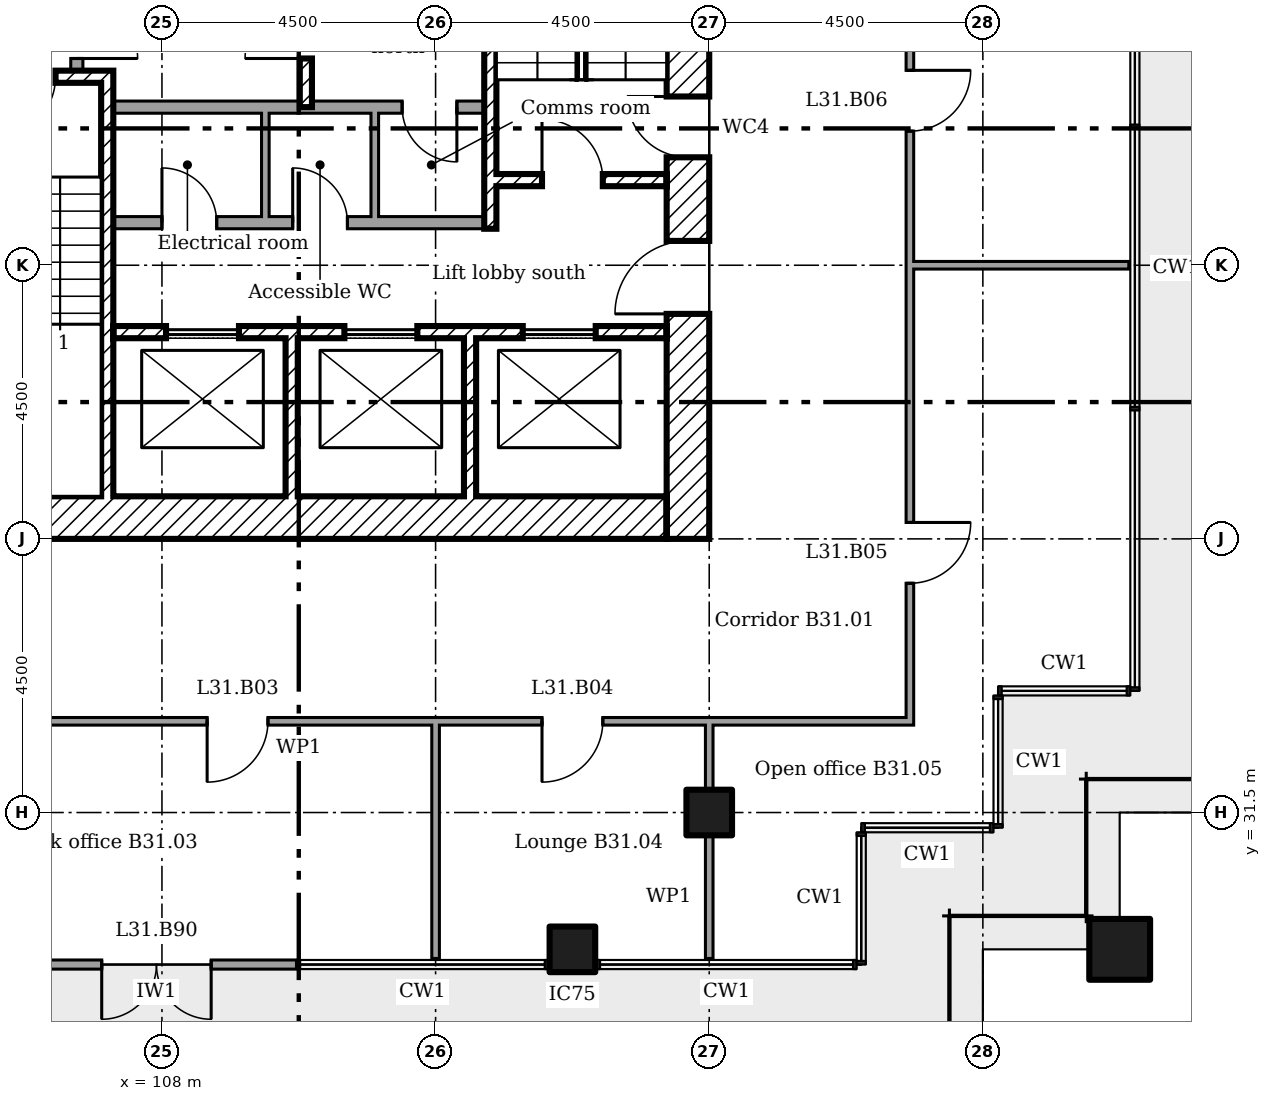
"""IFC4 building model, lengths in metres.
Left out: names, types, materials, properties, quantities, classifications, styles, units other than length and angle.
Written with IfcOpenShell. Run it as: python <this file> out.ifc"""

import sys

from ifc_helpers import new_model, si_unit, direction, frame, frame_2d, origin, origin_2d, place, context, subcontext, project, spatial, rectangle, extrude, element, fill, save


model = new_model("IFC4")
c1 = context("Model", 3, precision=1e-05, world=origin(), true_north=direction((0.0, 1.0)))
c2 = subcontext(c1, "Body", "Model", "MODEL_VIEW")
j1 = project(units=[si_unit("LENGTHUNIT", "METRE"), si_unit("PLANEANGLEUNIT", "RADIAN")], contexts=[c1])
p1 = place(None, origin())
s1 = spatial("IfcSite", under=j1, at=p1, CompositionType="ELEMENT")
p2 = place(p1, origin())
s2 = spatial("IfcBuilding", under=s1, at=p2, CompositionType="ELEMENT")
p3 = place(p2, frame((0.0, 0.0, 128.0)))
s3 = spatial("IfcBuildingStorey", under=s2, at=p3, CompositionType="ELEMENT", Elevation=128.0)
p4 = place(p3, frame((123.75, 29.25, 0.0)))
e1 = element("IfcColumn", 1, at=p4, inside=s3, PredefinedType="COLUMN", context=c2, shape_type="SweptSolid", body=[
    extrude(rectangle(XDim=1.0, YDim=1.0, at=origin_2d()), origin(), (0.0, 0.0, 1.0), 3.6),
])
for number, where in (
    (2, (114.75, 29.25, 0.0)),
    (3, (117.0, 31.5, 0.0)),
):
    element("IfcColumn", number, at=place(p3, frame(where)), inside=s3, PredefinedType="COLUMN", context=c2, shape_type="SweptSolid", body=[
        extrude(rectangle(XDim=0.75, YDim=0.75, at=origin_2d()), origin(), (0.0, 0.0, 1.0), 3.6),
    ])
p5 = place(p3, frame((105.606, 29.0, 0.0)))
e4 = element("IfcWall", 4, at=p5, inside=s3, PredefinedType="SOLIDWALL", context=c2, shape_type="SweptSolid", body=[
    extrude(rectangle(XDim=4.606, YDim=0.15, at=frame_2d((2.303, 0.0))), origin(), (0.0, 0.0, 1.0), 3.45),
])
p6 = place(p5, frame((1.403, 0.0, 0.0)))
e5 = element("IfcOpeningElement", 5, at=p6, cuts=e4, PredefinedType="OPENING", context=c2, shape_type="SweptSolid", body=[
    extrude(rectangle(XDim=1.8, YDim=2.4, at=frame_2d((0.9, 1.2))), frame((0.0, 0.085, 0.0), z_axis=(0.0, -1.0, 0.0), x_axis=(1.0, 0.0, 0.0)), (0.0, 0.0, 1.0), 0.17),
])
p7 = place(p3, frame((116.65, 36.0, 0.0), z_axis=(0.0, 0.0, 1.0), x_axis=(0.0, 1.0, 0.0)))
e6 = element("IfcWall", 6, at=p7, inside=s3, PredefinedType="SHEAR", context=c2, shape_type="SweptSolid", body=[
    extrude(rectangle(XDim=13.5, YDim=0.7, at=frame_2d((6.75, 0.0))), origin(), (0.0, 0.0, 1.0), 3.35),
])
p8 = place(p7, frame((3.7, 0.0, 0.0)))
e7 = element("IfcOpeningElement", 7, at=p8, cuts=e6, PredefinedType="OPENING", context=c2, shape_type="SweptSolid", body=[
    extrude(rectangle(XDim=1.2, YDim=2.1, at=frame_2d((0.6, 1.05))), frame((0.0, 0.36, 0.0), z_axis=(0.0, -1.0, 0.0), x_axis=(1.0, 0.0, 0.0)), (0.0, 0.0, 1.0), 0.72),
])
p9 = place(p7, frame((6.275, 0.0, 0.0)))
e8 = element("IfcOpeningElement", 8, at=p9, cuts=e6, PredefinedType="OPENING", context=c2, shape_type="SweptSolid", body=[
    extrude(rectangle(XDim=1.0, YDim=2.1, at=frame_2d((0.5, 1.05))), frame((0.0, 0.36, 0.0), z_axis=(0.0, -1.0, 0.0), x_axis=(1.0, 0.0, 0.0)), (0.0, 0.0, 1.0), 0.72),
])
p10 = place(p3, frame((104.2, 36.35, 0.0)))
e9 = element("IfcWall", 9, at=p10, inside=s3, PredefinedType="SHEAR", context=c2, shape_type="SweptSolid", body=[
    extrude(rectangle(XDim=12.1, YDim=0.7, at=frame_2d((6.05, 0.0))), origin(), (0.0, 0.0, 1.0), 3.35),
])
p11 = place(p3, frame((110.367, 48.8, 0.0), z_axis=(0.0, 0.0, 1.0), x_axis=(0.0, -1.0, 0.0)))
e10 = element("IfcWall", 10, at=p11, inside=s3, PredefinedType="SHEAR", context=c2, shape_type="SweptSolid", body=[
    extrude(rectangle(XDim=5.7, YDim=0.2, at=frame_2d((2.85, 0.0))), origin(), (0.0, 0.0, 1.0), 3.35),
])
p12 = place(p11, frame((3.9, 0.0, 0.0)))
e11 = element("IfcOpeningElement", 11, at=p12, cuts=e10, PredefinedType="OPENING", context=c2, shape_type="SweptSolid", body=[
    extrude(rectangle(XDim=1.0, YDim=2.1, at=frame_2d((0.5, 1.05))), frame((0.0, 0.11, 0.0), z_axis=(0.0, -1.0, 0.0), x_axis=(1.0, 0.0, 0.0)), (0.0, 0.0, 1.0), 0.22),
])
for number, where, z_axis, x_axis in (
    (12, (110.133, 36.7, 0.0), (0.0, 0.0, 1.0), (0.0, 1.0, 0.0)),
    (13, (113.067, 36.7, 0.0), (0.0, 0.0, 1.0), (0.0, 1.0, 0.0)),
):
    element("IfcWall", number, at=place(p3, frame(where, z_axis=z_axis, x_axis=x_axis)), inside=s3, PredefinedType="SHEAR", context=c2, shape_type="SweptSolid", body=[
        extrude(rectangle(XDim=2.6, YDim=0.2, at=frame_2d((1.3, 0.0))), origin(), (0.0, 0.0, 1.0), 3.35),
    ])
p13 = place(p3, frame((106.6, 43.7, 0.0), z_axis=(0.0, 0.0, 1.0), x_axis=(0.0, 1.0, 0.0)))
e14 = element("IfcWall", 14, at=p13, inside=s3, PredefinedType="PARTITIONING", context=c2, shape_type="SweptSolid", body=[
    extrude(rectangle(XDim=1.5, YDim=0.2, at=frame_2d((0.75, 0.0))), origin(), (0.0, 0.0, 1.0), 3.35),
])
p14 = place(p13, frame((0.2, 0.0, 0.0)))
e15 = element("IfcOpeningElement", 15, at=p14, cuts=e14, PredefinedType="OPENING", context=c2, shape_type="SweptSolid", body=[
    extrude(rectangle(XDim=1.0, YDim=2.1, at=frame_2d((0.5, 1.05))), frame((0.0, 0.11, 0.0), z_axis=(0.0, -1.0, 0.0), x_axis=(1.0, 0.0, 0.0)), (0.0, 0.0, 1.0), 0.22),
])
p15 = place(p3, frame((107.2, 39.4, 0.0)))
e16 = element("IfcWall", 16, at=p15, inside=s3, PredefinedType="SHEAR", context=c2, shape_type="SweptSolid", body=[
    extrude(rectangle(XDim=9.1, YDim=0.2, at=frame_2d((4.55, 0.0))), origin(), (0.0, 0.0, 1.0), 3.35),
])
p16 = place(p15, frame((0.867, 0.0, 0.0)))
e17 = element("IfcOpeningElement", 17, at=p16, cuts=e16, PredefinedType="OPENING", context=c2, shape_type="SweptSolid", body=[
    extrude(rectangle(XDim=1.2, YDim=2.1, at=frame_2d((0.6, 1.05))), frame((0.0, 0.11, 0.0), z_axis=(0.0, -1.0, 0.0), x_axis=(1.0, 0.0, 0.0)), (0.0, 0.0, 1.0), 0.22),
])
p17 = place(p15, frame((3.8, 0.0, 0.0)))
e18 = element("IfcOpeningElement", 18, at=p17, cuts=e16, PredefinedType="OPENING", context=c2, shape_type="SweptSolid", body=[
    extrude(rectangle(XDim=1.2, YDim=2.1, at=frame_2d((0.6, 1.05))), frame((0.0, 0.11, 0.0), z_axis=(0.0, -1.0, 0.0), x_axis=(1.0, 0.0, 0.0)), (0.0, 0.0, 1.0), 0.22),
])
p18 = place(p15, frame((6.733, 0.0, 0.0)))
e19 = element("IfcOpeningElement", 19, at=p18, cuts=e16, PredefinedType="OPENING", context=c2, shape_type="SweptSolid", body=[
    extrude(rectangle(XDim=1.2, YDim=2.1, at=frame_2d((0.6, 1.05))), frame((0.0, 0.11, 0.0), z_axis=(0.0, -1.0, 0.0), x_axis=(1.0, 0.0, 0.0)), (0.0, 0.0, 1.0), 0.22),
])
p19 = place(p3, frame((107.1, 36.7, 0.0), z_axis=(0.0, 0.0, 1.0), x_axis=(0.0, 1.0, 0.0)))
e20 = element("IfcWall", 20, at=p19, inside=s3, PredefinedType="SHEAR", context=c2, shape_type="SweptSolid", body=[
    extrude(rectangle(XDim=7.0, YDim=0.2, at=frame_2d((3.5, 0.0))), origin(), (0.0, 0.0, 1.0), 3.35),
])
p20 = place(p3, frame((104.2, 43.6, 0.0)))
e21 = element("IfcWall", 21, at=p20, inside=s3, PredefinedType="SHEAR", context=c2, shape_type="SweptSolid", body=[
    extrude(rectangle(XDim=2.8, YDim=0.2, at=frame_2d((1.4, 0.0))), origin(), (0.0, 0.0, 1.0), 3.35),
])
p21 = place(p20, frame((1.05, 0.0, 0.0)))
e22 = element("IfcOpeningElement", 22, at=p21, cuts=e21, PredefinedType="OPENING", context=c2, shape_type="SweptSolid", body=[
    extrude(rectangle(XDim=1.0, YDim=2.1, at=frame_2d((0.5, 1.05))), frame((0.0, 0.11, 0.0), z_axis=(0.0, -1.0, 0.0), x_axis=(1.0, 0.0, 0.0)), (0.0, 0.0, 1.0), 0.22),
])
p22 = place(p3, frame((113.5, 41.9, 0.0)))
e23 = element("IfcWall", 23, at=p22, inside=s3, PredefinedType="SHEAR", context=c2, shape_type="SweptSolid", body=[
    extrude(rectangle(XDim=2.8, YDim=0.2, at=frame_2d((1.4, 0.0))), origin(), (0.0, 0.0, 1.0), 3.35),
])
p23 = place(p22, frame((0.75, 0.0, 0.0)))
e24 = element("IfcOpeningElement", 24, at=p23, cuts=e23, PredefinedType="OPENING", context=c2, shape_type="SweptSolid", body=[
    extrude(rectangle(XDim=1.0, YDim=2.1, at=frame_2d((0.5, 1.05))), frame((0.0, 0.11, 0.0), z_axis=(0.0, -1.0, 0.0), x_axis=(1.0, 0.0, 0.0)), (0.0, 0.0, 1.0), 0.22),
])
p24 = place(p3, frame((113.4, 41.1, 0.0), z_axis=(0.0, 0.0, 1.0), x_axis=(0.0, 1.0, 0.0)))
e25 = element("IfcWall", 25, at=p24, inside=s3, PredefinedType="SHEAR", context=c2, shape_type="SweptSolid", body=[
    extrude(rectangle(XDim=7.7, YDim=0.2, at=frame_2d((3.85, 0.0))), origin(), (0.0, 0.0, 1.0), 3.35),
])
p25 = place(p3, frame((107.2, 43.1, 0.0)))
e26 = element("IfcWall", 26, at=p25, inside=s3, PredefinedType="PARTITIONING", context=c2, shape_type="SweptSolid", body=[
    extrude(rectangle(XDim=6.1, YDim=0.2, at=frame_2d((3.05, 0.0))), origin(), (0.0, 0.0, 1.0), 3.35),
])
p26 = place(p25, frame((4.75, 0.0, 0.0)))
e27 = element("IfcOpeningElement", 27, at=p26, cuts=e26, PredefinedType="OPENING", context=c2, shape_type="SweptSolid", body=[
    extrude(rectangle(XDim=0.9, YDim=2.1, at=frame_2d((0.45, 1.05))), frame((0.0, 0.11, 0.0), z_axis=(0.0, -1.0, 0.0), x_axis=(1.0, 0.0, 0.0)), (0.0, 0.0, 1.0), 0.22),
])
p27 = place(p3, frame((107.2, 41.2, 0.0)))
e28 = element("IfcWall", 28, at=p27, inside=s3, PredefinedType="PARTITIONING", context=c2, shape_type="SweptSolid", body=[
    extrude(rectangle(XDim=6.1, YDim=0.2, at=frame_2d((3.05, 0.0))), origin(), (0.0, 0.0, 1.0), 3.35),
])
p28 = place(p27, frame((0.8, 0.0, 0.0)))
e29 = element("IfcOpeningElement", 29, at=p28, cuts=e28, PredefinedType="OPENING", context=c2, shape_type="SweptSolid", body=[
    extrude(rectangle(XDim=0.9, YDim=2.1, at=frame_2d((0.45, 1.05))), frame((0.0, 0.11, 0.0), z_axis=(0.0, -1.0, 0.0), x_axis=(1.0, 0.0, 0.0)), (0.0, 0.0, 1.0), 0.22),
])
p29 = place(p27, frame((2.95, 0.0, 0.0)))
e30 = element("IfcOpeningElement", 30, at=p29, cuts=e28, PredefinedType="OPENING", context=c2, shape_type="SweptSolid", body=[
    extrude(rectangle(XDim=0.9, YDim=2.1, at=frame_2d((0.45, 1.05))), frame((0.0, 0.11, 0.0), z_axis=(0.0, -1.0, 0.0), x_axis=(1.0, 0.0, 0.0)), (0.0, 0.0, 1.0), 0.22),
])
for number, where, z_axis, x_axis in (
    (31, (109.7, 41.3, 0.0), (0.0, 0.0, 1.0), (0.0, 1.0, 0.0)),
    (32, (111.5, 41.3, 0.0), (0.0, 0.0, 1.0), (0.0, 1.0, 0.0)),
):
    element("IfcWall", number, at=place(p3, frame(where, z_axis=z_axis, x_axis=x_axis)), inside=s3, PredefinedType="PARTITIONING", context=c2, shape_type="SweptSolid", body=[
        extrude(rectangle(XDim=1.7, YDim=0.125, at=frame_2d((0.85, 0.0))), origin(), (0.0, 0.0, 1.0), 3.35),
    ])
p30 = place(p3, frame((100.137, 33.0, 0.0)))
e33 = element("IfcWall", 33, at=p30, inside=s3, PredefinedType="PARTITIONING", context=c2, shape_type="SweptSolid", body=[
    extrude(rectangle(XDim=20.225, YDim=0.125, at=frame_2d((10.113, 0.0))), origin(), (0.0, 0.0, 1.0), 3.45),
])
p31 = place(p30, frame((8.605, 0.0, 0.0)))
e34 = element("IfcOpeningElement", 34, at=p31, cuts=e33, PredefinedType="OPENING", context=c2, shape_type="SweptSolid", body=[
    extrude(rectangle(XDim=1.0, YDim=2.1, at=frame_2d((0.5, 1.05))), frame((0.0, 0.073, 0.0), z_axis=(0.0, -1.0, 0.0), x_axis=(1.0, 0.0, 0.0)), (0.0, 0.0, 1.0), 0.145),
])
p32 = place(p30, frame((14.113, 0.0, 0.0)))
e35 = element("IfcOpeningElement", 35, at=p32, cuts=e33, PredefinedType="OPENING", context=c2, shape_type="SweptSolid", body=[
    extrude(rectangle(XDim=1.0, YDim=2.1, at=frame_2d((0.5, 1.05))), frame((0.0, 0.073, 0.0), z_axis=(0.0, -1.0, 0.0), x_axis=(1.0, 0.0, 0.0)), (0.0, 0.0, 1.0), 0.145),
])
p33 = place(p3, frame((120.3, 40.5, 0.0)))
e36 = element("IfcWall", 36, at=p33, inside=s3, PredefinedType="PARTITIONING", context=c2, shape_type="SweptSolid", body=[
    extrude(rectangle(XDim=3.6, YDim=0.125, at=frame_2d((1.8, 0.0))), origin(), (0.0, 0.0, 1.0), 2.851),
])
p34 = place(p3, frame((112.5, 29.1, 0.0), z_axis=(0.0, 0.0, 1.0), x_axis=(0.0, 1.0, 0.0)))
e37 = element("IfcWall", 37, at=p34, inside=s3, PredefinedType="PARTITIONING", context=c2, shape_type="SweptSolid", body=[
    extrude(rectangle(XDim=3.9, YDim=0.125, at=frame_2d((1.95, 0.0))), origin(), (0.0, 0.0, 1.0), 2.851),
])
p35 = place(p3, frame((117.0, 29.1, 0.0), z_axis=(0.0, 0.0, 1.0), x_axis=(0.0, 1.0, 0.0)))
e38 = element("IfcWall", 38, at=p35, inside=s3, PredefinedType="PARTITIONING", context=c2, shape_type="SweptSolid", body=[
    extrude(rectangle(XDim=2.025, YDim=0.125, at=frame_2d((1.012, 0.0))), origin(), (0.0, 0.0, 1.0), 2.842),
])
p36 = place(p3, frame((117.0, 31.875, 0.0), z_axis=(0.0, 0.0, 1.0), x_axis=(0.0, 1.0, 0.0)))
e39 = element("IfcWall", 39, at=p36, inside=s3, PredefinedType="PARTITIONING", context=c2, shape_type="SweptSolid", body=[
    extrude(rectangle(XDim=1.125, YDim=0.125, at=frame_2d((0.562, 0.0))), origin(), (0.0, 0.0, 1.0), 2.842),
])
p37 = place(p3, frame((120.3, 33.062, 0.0), z_axis=(0.0, 0.0, 1.0), x_axis=(0.0, 1.0, 0.0)))
e40 = element("IfcWall", 40, at=p37, inside=s3, PredefinedType="PARTITIONING", context=c2, shape_type="SweptSolid", body=[
    extrude(rectangle(XDim=14.337, YDim=0.125, at=frame_2d((7.169, 0.0))), origin(), (0.0, 0.0, 1.0), 3.45),
])
p38 = place(p37, frame((2.208, 0.0, 0.0)))
e41 = element("IfcOpeningElement", 41, at=p38, cuts=e40, PredefinedType="OPENING", context=c2, shape_type="SweptSolid", body=[
    extrude(rectangle(XDim=1.0, YDim=2.1, at=frame_2d((0.5, 1.05))), frame((0.0, 0.073, 0.0), z_axis=(0.0, -1.0, 0.0), x_axis=(1.0, 0.0, 0.0)), (0.0, 0.0, 1.0), 0.145),
])
p39 = place(p37, frame((9.643, 0.0, 0.0)))
e42 = element("IfcOpeningElement", 42, at=p39, cuts=e40, PredefinedType="OPENING", context=c2, shape_type="SweptSolid", body=[
    extrude(rectangle(XDim=1.0, YDim=2.1, at=frame_2d((0.5, 1.05))), frame((0.0, 0.073, 0.0), z_axis=(0.0, -1.0, 0.0), x_axis=(1.0, 0.0, 0.0)), (0.0, 0.0, 1.0), 0.145),
])
p40 = place(p6, frame((1.8, 0.0, 0.0), x_axis=(-1.0, 0.0, 0.0)))
e43 = element("IfcDoor", 43, at=p40, inside=s3, OperationType="DOUBLE_DOOR_DOUBLE_SWING", PredefinedType="NOTDEFINED", context=c2, shape_type="SweptSolid", body=[
    extrude(rectangle(XDim=1.8, YDim=2.4, at=frame_2d((0.9, 1.2))), frame((0.0, 0.025, 0.0), z_axis=(0.0, -1.0, 0.0), x_axis=(1.0, 0.0, 0.0)), (0.0, 0.0, 1.0), 0.05),
])
fill(e5, e43)
p41 = place(p8, origin())
e44 = element("IfcDoor", 44, at=p41, inside=s3, OperationType="SINGLE_SWING_RIGHT", PredefinedType="DOOR", context=c2, shape_type="SweptSolid", body=[
    extrude(rectangle(XDim=1.2, YDim=2.1, at=frame_2d((0.6, 1.05))), frame((0.0, 0.025, 0.0), z_axis=(0.0, -1.0, 0.0), x_axis=(1.0, 0.0, 0.0)), (0.0, 0.0, 1.0), 0.05),
])
fill(e7, e44)
p42 = place(p21, frame((1.0, 0.0, 0.0), x_axis=(-1.0, 0.0, 0.0)))
e45 = element("IfcDoor", 45, at=p42, inside=s3, OperationType="SINGLE_SWING_LEFT", PredefinedType="DOOR", context=c2, shape_type="SweptSolid", body=[
    extrude(rectangle(XDim=1.0, YDim=2.1, at=frame_2d((0.5, 1.05))), frame((0.0, 0.025, 0.0), z_axis=(0.0, -1.0, 0.0), x_axis=(1.0, 0.0, 0.0)), (0.0, 0.0, 1.0), 0.05),
])
fill(e22, e45)
p43 = place(p23, origin())
e46 = element("IfcDoor", 46, at=p43, inside=s3, OperationType="SINGLE_SWING_RIGHT", PredefinedType="DOOR", context=c2, shape_type="SweptSolid", body=[
    extrude(rectangle(XDim=1.0, YDim=2.1, at=frame_2d((0.5, 1.05))), frame((0.0, 0.025, 0.0), z_axis=(0.0, -1.0, 0.0), x_axis=(1.0, 0.0, 0.0)), (0.0, 0.0, 1.0), 0.05),
])
fill(e24, e46)
p44 = place(p9, origin())
e47 = element("IfcDoor", 47, at=p44, inside=s3, OperationType="SINGLE_SWING_LEFT", PredefinedType="DOOR", context=c2, shape_type="SweptSolid", body=[
    extrude(rectangle(XDim=1.0, YDim=2.1, at=frame_2d((0.5, 1.05))), frame((0.0, 0.025, 0.0), z_axis=(0.0, -1.0, 0.0), x_axis=(1.0, 0.0, 0.0)), (0.0, 0.0, 1.0), 0.05),
])
fill(e8, e47)
p45 = place(p12, frame((1.0, 0.0, 0.0), x_axis=(-1.0, 0.0, 0.0)))
e48 = element("IfcDoor", 48, at=p45, inside=s3, OperationType="SINGLE_SWING_RIGHT", PredefinedType="DOOR", context=c2, shape_type="SweptSolid", body=[
    extrude(rectangle(XDim=1.0, YDim=2.1, at=frame_2d((0.5, 1.05))), frame((0.0, 0.025, 0.0), z_axis=(0.0, -1.0, 0.0), x_axis=(1.0, 0.0, 0.0)), (0.0, 0.0, 1.0), 0.05),
])
fill(e11, e48)
p46 = place(p14, frame((1.0, 0.0, 0.0), x_axis=(-1.0, 0.0, 0.0)))
e49 = element("IfcDoor", 49, at=p46, inside=s3, OperationType="SINGLE_SWING_LEFT", PredefinedType="DOOR", context=c2, shape_type="SweptSolid", body=[
    extrude(rectangle(XDim=1.0, YDim=2.1, at=frame_2d((0.5, 1.05))), frame((0.0, 0.025, 0.0), z_axis=(0.0, -1.0, 0.0), x_axis=(1.0, 0.0, 0.0)), (0.0, 0.0, 1.0), 0.05),
])
fill(e15, e49)
p47 = place(p28, origin())
e50 = element("IfcDoor", 50, at=p47, inside=s3, OperationType="SINGLE_SWING_RIGHT", PredefinedType="DOOR", context=c2, shape_type="SweptSolid", body=[
    extrude(rectangle(XDim=0.9, YDim=2.1, at=frame_2d((0.45, 1.05))), frame((0.0, 0.025, 0.0), z_axis=(0.0, -1.0, 0.0), x_axis=(1.0, 0.0, 0.0)), (0.0, 0.0, 1.0), 0.05),
])
fill(e29, e50)
p48 = place(p29, origin())
e51 = element("IfcDoor", 51, at=p48, inside=s3, OperationType="SINGLE_SWING_RIGHT", PredefinedType="DOOR", context=c2, shape_type="SweptSolid", body=[
    extrude(rectangle(XDim=0.9, YDim=2.1, at=frame_2d((0.45, 1.05))), frame((0.0, 0.025, 0.0), z_axis=(0.0, -1.0, 0.0), x_axis=(1.0, 0.0, 0.0)), (0.0, 0.0, 1.0), 0.05),
])
fill(e30, e51)
p49 = place(p26, frame((0.9, 0.0, 0.0), x_axis=(-1.0, 0.0, 0.0)))
e52 = element("IfcDoor", 52, at=p49, inside=s3, OperationType="SINGLE_SWING_RIGHT", PredefinedType="DOOR", context=c2, shape_type="SweptSolid", body=[
    extrude(rectangle(XDim=0.9, YDim=2.1, at=frame_2d((0.45, 1.05))), frame((0.0, 0.025, 0.0), z_axis=(0.0, -1.0, 0.0), x_axis=(1.0, 0.0, 0.0)), (0.0, 0.0, 1.0), 0.05),
])
fill(e27, e52)
p50 = place(p16, origin())
e53 = element("IfcDoor", 53, at=p50, inside=s3, OperationType="SLIDING_TO_LEFT", PredefinedType="DOOR", context=c2, shape_type="SweptSolid", body=[
    extrude(rectangle(XDim=1.2, YDim=2.1, at=frame_2d((0.6, 1.05))), frame((0.0, 0.025, 0.0), z_axis=(0.0, -1.0, 0.0), x_axis=(1.0, 0.0, 0.0)), (0.0, 0.0, 1.0), 0.05),
])
fill(e17, e53)
p51 = place(p17, origin())
e54 = element("IfcDoor", 54, at=p51, inside=s3, OperationType="SLIDING_TO_LEFT", PredefinedType="DOOR", context=c2, shape_type="SweptSolid", body=[
    extrude(rectangle(XDim=1.2, YDim=2.1, at=frame_2d((0.6, 1.05))), frame((0.0, 0.025, 0.0), z_axis=(0.0, -1.0, 0.0), x_axis=(1.0, 0.0, 0.0)), (0.0, 0.0, 1.0), 0.05),
])
fill(e18, e54)
p52 = place(p18, origin())
e55 = element("IfcDoor", 55, at=p52, inside=s3, OperationType="SLIDING_TO_LEFT", PredefinedType="DOOR", context=c2, shape_type="SweptSolid", body=[
    extrude(rectangle(XDim=1.2, YDim=2.1, at=frame_2d((0.6, 1.05))), frame((0.0, 0.025, 0.0), z_axis=(0.0, -1.0, 0.0), x_axis=(1.0, 0.0, 0.0)), (0.0, 0.0, 1.0), 0.05),
])
fill(e19, e55)
p53 = place(p31, frame((1.0, 0.0, 0.0), x_axis=(-1.0, 0.0, 0.0)))
e56 = element("IfcDoor", 56, at=p53, inside=s3, OperationType="SINGLE_SWING_LEFT", PredefinedType="DOOR", context=c2, shape_type="SweptSolid", body=[
    extrude(rectangle(XDim=1.0, YDim=2.1, at=frame_2d((0.5, 1.05))), frame((0.0, 0.025, 0.0), z_axis=(0.0, -1.0, 0.0), x_axis=(1.0, 0.0, 0.0)), (0.0, 0.0, 1.0), 0.05),
])
fill(e34, e56)
p54 = place(p32, frame((1.0, 0.0, 0.0), x_axis=(-1.0, 0.0, 0.0)))
e57 = element("IfcDoor", 57, at=p54, inside=s3, OperationType="SINGLE_SWING_LEFT", PredefinedType="DOOR", context=c2, shape_type="SweptSolid", body=[
    extrude(rectangle(XDim=1.0, YDim=2.1, at=frame_2d((0.5, 1.05))), frame((0.0, 0.025, 0.0), z_axis=(0.0, -1.0, 0.0), x_axis=(1.0, 0.0, 0.0)), (0.0, 0.0, 1.0), 0.05),
])
fill(e35, e57)
p55 = place(p38, frame((1.0, 0.0, 0.0), x_axis=(-1.0, 0.0, 0.0)))
e58 = element("IfcDoor", 58, at=p55, inside=s3, OperationType="SINGLE_SWING_RIGHT", PredefinedType="DOOR", context=c2, shape_type="SweptSolid", body=[
    extrude(rectangle(XDim=1.0, YDim=2.1, at=frame_2d((0.5, 1.05))), frame((0.0, 0.025, 0.0), z_axis=(0.0, -1.0, 0.0), x_axis=(1.0, 0.0, 0.0)), (0.0, 0.0, 1.0), 0.05),
])
fill(e41, e58)
p56 = place(p39, frame((1.0, 0.0, 0.0), x_axis=(-1.0, 0.0, 0.0)))
e59 = element("IfcDoor", 59, at=p56, inside=s3, OperationType="SINGLE_SWING_RIGHT", PredefinedType="DOOR", context=c2, shape_type="SweptSolid", body=[
    extrude(rectangle(XDim=1.0, YDim=2.1, at=frame_2d((0.5, 1.05))), frame((0.0, 0.025, 0.0), z_axis=(0.0, -1.0, 0.0), x_axis=(1.0, 0.0, 0.0)), (0.0, 0.0, 1.0), 0.05),
])
fill(e42, e59)
save(model, sys.argv[1])
